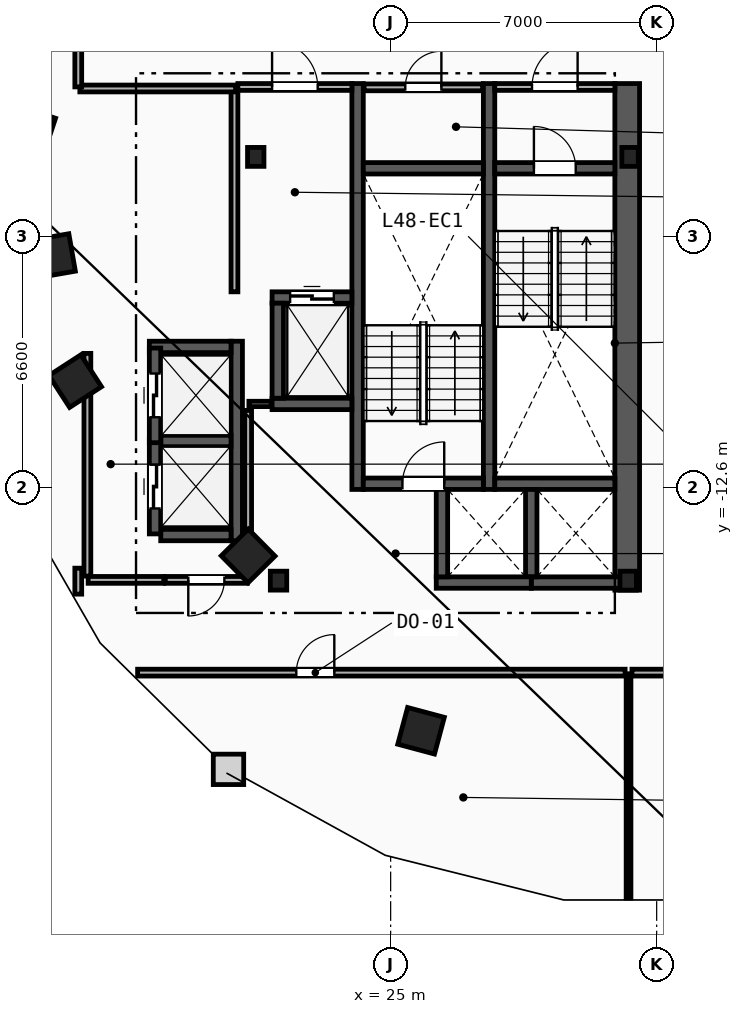
"""IFC4 building model, lengths in metres.
Left out: names, types, materials, properties, quantities, classifications, styles, units other than length and angle.
Written with IfcOpenShell. Run it as: python <this file> out.ifc"""

import sys

from ifc_helpers import new_model, si_unit, direction, frame, frame_2d, origin, origin_2d, place, context, subcontext, project, spatial, rectangle, i_section, extrude, element, fill, save


model = new_model("IFC4")
c1 = context("Model", 3, precision=1e-05, world=origin(), true_north=direction((0.0, 1.0)))
c2 = subcontext(c1, "Body", "Model", "MODEL_VIEW")
j1 = project(units=[si_unit("LENGTHUNIT", "METRE"), si_unit("PLANEANGLEUNIT", "RADIAN")], contexts=[c1])
p1 = place(None, origin())
s1 = spatial("IfcSite", under=j1, at=p1, CompositionType="ELEMENT")
p2 = place(p1, origin())
s2 = spatial("IfcBuilding", under=s1, at=p2, CompositionType="ELEMENT")
p3 = place(p2, frame((0.0, 0.0, 183.6)))
s3 = spatial("IfcBuildingStorey", under=s2, at=p3, CompositionType="ELEMENT", Elevation=183.6)
for number, where, z_axis, x_axis in (
    (1, (31.3, -3.9, 0.0), (0.0, 0.0, 1.0), (1.0, 0.0, 0.0)),
    (2, (21.45, -3.9, 0.0), (0.0, 0.0, 1.0), (1.0, 0.0, 0.0)),
    (3, (22.05, -15.05, 0.0), (0.0, 0.0, 1.0), (1.0, 0.0, 0.0)),
    (4, (31.25, -15.05, 0.0), (0.0, 0.0, 1.0), (1.0, 0.0, 0.0)),
):
    element("IfcColumn", number, at=place(p3, frame(where, z_axis=z_axis, x_axis=x_axis)), inside=s3, PredefinedType="COLUMN", context=c2, shape_type="SweptSolid", body=[
        extrude(i_section(OverallWidth=0.432, OverallDepth=0.498, WebThickness=0.056, FlangeThickness=0.089, FilletRadius=0.018, at=origin_2d()), origin(), (0.0, 0.0, 1.0), 3.6),
    ])
for number, where, z_axis, x_axis in (
    (5, (15.55, -3.2, 0.0), (0.0, 0.0, 1.0), (-0.315, -0.949, 0.0)),
    (6, (16.125, -6.5, 0.0), (0.0, 0.0, 1.0), (0.172, -0.985, 0.0)),
    (7, (16.7, -9.8, 0.0), (0.0, 0.0, 1.0), (0.544, -0.839, 0.0)),
    (8, (21.25, -14.4, 0.0), (0.0, 0.0, 1.0), (0.703, -0.711, 0.0)),
    (9, (25.8, -19.0, 0.0), (0.0, 0.0, 1.0), (0.966, -0.259, 0.0)),
):
    element("IfcColumn", number, at=place(p3, frame(where, z_axis=z_axis, x_axis=x_axis)), inside=s3, PredefinedType="COLUMN", context=c2, shape_type="SweptSolid", body=[
        extrude(rectangle(XDim=1.0, YDim=1.0, at=origin_2d()), origin(), (0.0, 0.0, 1.0), 3.6),
    ])
p4 = place(p3, frame((31.225, -15.3, 0.0), z_axis=(0.0, 0.0, 1.0), x_axis=(0.0, 1.0, 0.0)))
e10 = element("IfcWall", 10, at=p4, inside=s3, PredefinedType="SHEAR", context=c2, shape_type="SweptSolid", body=[
    extrude(rectangle(XDim=13.33, YDim=0.65, at=frame_2d((6.665, 0.0))), origin(), (0.0, 0.0, 1.0), 3.32),
])
for number, where, z_axis, x_axis in (
    (11, (27.59, -12.65, 0.0), (0.0, 0.0, 1.0), (0.0, 1.0, 0.0)),
    (12, (24.13, -12.65, 0.0), (0.0, 0.0, 1.0), (0.0, 1.0, 0.0)),
):
    element("IfcWall", number, at=place(p3, frame(where, z_axis=z_axis, x_axis=x_axis)), inside=s3, PredefinedType="SHEAR", context=c2, shape_type="SweptSolid", body=[
        extrude(rectangle(XDim=10.68, YDim=0.3, at=frame_2d((5.34, 0.0))), origin(), (0.0, 0.0, 1.0), 3.32),
    ])
p5 = place(p3, frame((27.74, -4.2, 0.0), z_axis=(0.0, 0.0, 1.0), x_axis=(1.0, 0.0, 0.0)))
e13 = element("IfcWall", 13, at=p5, inside=s3, PredefinedType="SHEAR", context=c2, shape_type="SweptSolid", body=[
    extrude(rectangle(XDim=3.16, YDim=0.3, at=frame_2d((1.58, 0.0))), origin(), (0.0, 0.0, 1.0), 3.32),
])
p6 = place(p5, frame((1.03, 0.0, 0.0)))
e14 = element("IfcOpeningElement", 14, at=p6, cuts=e13, PredefinedType="OPENING", context=c2, shape_type="SweptSolid", body=[
    extrude(rectangle(XDim=1.1, YDim=2.15, at=frame_2d((0.55, 1.075))), frame((0.0, 0.16, 0.0), z_axis=(0.0, -1.0, 0.0), x_axis=(1.0, 0.0, 0.0)), (0.0, 0.0, 1.0), 0.32),
])
p7 = place(p3, frame((27.74, -12.5, 0.0), z_axis=(0.0, 0.0, 1.0), x_axis=(1.0, 0.0, 0.0)))
e15 = element("IfcWall", 15, at=p7, inside=s3, PredefinedType="SHEAR", context=c2, shape_type="SweptSolid", body=[
    extrude(rectangle(XDim=3.16, YDim=0.3, at=frame_2d((1.58, 0.0))), origin(), (0.0, 0.0, 1.0), 3.32),
])
p8 = place(p3, frame((24.28, -12.5, 0.0), z_axis=(0.0, 0.0, 1.0), x_axis=(1.0, 0.0, 0.0)))
e16 = element("IfcWall", 16, at=p8, inside=s3, PredefinedType="SHEAR", context=c2, shape_type="SweptSolid", body=[
    extrude(rectangle(XDim=3.16, YDim=0.3, at=frame_2d((1.58, 0.0))), origin(), (0.0, 0.0, 1.0), 3.32),
])
p9 = place(p8, frame((1.03, 0.0, 0.0)))
e17 = element("IfcOpeningElement", 17, at=p9, cuts=e16, PredefinedType="OPENING", context=c2, shape_type="SweptSolid", body=[
    extrude(rectangle(XDim=1.1, YDim=2.15, at=frame_2d((0.55, 1.075))), frame((0.0, 0.16, 0.0), z_axis=(0.0, -1.0, 0.0), x_axis=(1.0, 0.0, 0.0)), (0.0, 0.0, 1.0), 0.32),
])
p10 = place(p3, frame((24.28, -4.2, 0.0), z_axis=(0.0, 0.0, 1.0), x_axis=(1.0, 0.0, 0.0)))
e18 = element("IfcWall", 18, at=p10, inside=s3, PredefinedType="SHEAR", context=c2, shape_type="SweptSolid", body=[
    extrude(rectangle(XDim=3.16, YDim=0.3, at=frame_2d((1.58, 0.0))), origin(), (0.0, 0.0, 1.0), 3.32),
])
p11 = place(p3, frame((20.89, -7.45, 0.0), z_axis=(0.0, 0.0, 1.0), x_axis=(0.0, 1.0, 0.0)))
e19 = element("IfcWall", 19, at=p11, inside=s3, PredefinedType="PARTITIONING", context=c2, shape_type="SweptSolid", body=[
    extrude(rectangle(XDim=5.3, YDim=0.18, at=frame_2d((2.65, 0.0))), origin(), (0.0, 0.0, 1.0), 3.32),
])
p12 = place(p3, frame((20.98, -2.06, 0.0), z_axis=(0.0, 0.0, 1.0), x_axis=(1.0, 0.0, 0.0)))
e20 = element("IfcWall", 20, at=p12, inside=s3, PredefinedType="PARTITIONING", context=c2, shape_type="SweptSolid", body=[
    extrude(rectangle(XDim=3.0, YDim=0.18, at=frame_2d((1.5, 0.0))), origin(), (0.0, 0.0, 1.0), 3.32),
])
p13 = place(p12, frame((0.9, 0.0, 0.0)))
e21 = element("IfcOpeningElement", 21, at=p13, cuts=e20, PredefinedType="OPENING", context=c2, shape_type="SweptSolid", body=[
    extrude(rectangle(XDim=1.2, YDim=2.15, at=frame_2d((0.6, 1.075))), frame((0.0, 0.1, 0.0), z_axis=(0.0, -1.0, 0.0), x_axis=(1.0, 0.0, 0.0)), (0.0, 0.0, 1.0), 0.2),
])
p14 = place(p3, frame((27.74, -2.06, 0.0), z_axis=(0.0, 0.0, 1.0), x_axis=(1.0, 0.0, 0.0)))
e22 = element("IfcWall", 22, at=p14, inside=s3, PredefinedType="PARTITIONING", context=c2, shape_type="SweptSolid", body=[
    extrude(rectangle(XDim=3.16, YDim=0.18, at=frame_2d((1.58, 0.0))), origin(), (0.0, 0.0, 1.0), 3.32),
])
p15 = place(p14, frame((0.98, 0.0, 0.0)))
e23 = element("IfcOpeningElement", 23, at=p15, cuts=e22, PredefinedType="OPENING", context=c2, shape_type="SweptSolid", body=[
    extrude(rectangle(XDim=1.2, YDim=2.15, at=frame_2d((0.6, 1.075))), frame((0.0, 0.1, 0.0), z_axis=(0.0, -1.0, 0.0), x_axis=(1.0, 0.0, 0.0)), (0.0, 0.0, 1.0), 0.2),
])
p16 = place(p3, frame((21.88, -7.6, 0.0), z_axis=(0.0, 0.0, 1.0), x_axis=(1.0, 0.0, 0.0)))
e24 = element("IfcWall", 24, at=p16, inside=s3, PredefinedType="SHEAR", context=c2, shape_type="SweptSolid", body=[
    extrude(rectangle(XDim=2.1, YDim=0.3, at=frame_2d((1.05, 0.0))), origin(), (0.0, 0.0, 1.0), 3.32),
])
p17 = place(p16, frame((0.475, 0.0, 0.0)))
e25 = element("IfcOpeningElement", 25, at=p17, cuts=e24, PredefinedType="OPENING", context=c2, shape_type="SweptSolid", body=[
    extrude(rectangle(XDim=1.15, YDim=2.2, at=frame_2d((0.575, 1.1))), frame((0.0, 0.16, 0.0), z_axis=(0.0, -1.0, 0.0), x_axis=(1.0, 0.0, 0.0)), (0.0, 0.0, 1.0), 0.32),
])
p18 = place(p3, frame((21.88, -10.4, 0.0), z_axis=(0.0, 0.0, 1.0), x_axis=(1.0, 0.0, 0.0)))
e26 = element("IfcWall", 26, at=p18, inside=s3, PredefinedType="SHEAR", context=c2, shape_type="SweptSolid", body=[
    extrude(rectangle(XDim=2.1, YDim=0.3, at=frame_2d((1.05, 0.0))), origin(), (0.0, 0.0, 1.0), 3.32),
])
for number, where, z_axis, x_axis in (
    (27, (22.03, -10.25, 0.0), (0.0, 0.0, 1.0), (0.0, 1.0, 0.0)),
    (28, (28.7, -15.1, 0.0), (0.0, 0.0, 1.0), (1.0, 0.0, 0.0)),
):
    element("IfcWall", number, at=place(p3, frame(where, z_axis=z_axis, x_axis=x_axis)), inside=s3, PredefinedType="SHEAR", context=c2, shape_type="SweptSolid", body=[
        extrude(rectangle(XDim=2.5, YDim=0.3, at=frame_2d((1.25, 0.0))), origin(), (0.0, 0.0, 1.0), 3.32),
    ])
p19 = place(p3, frame((28.7, -14.95, 0.0), z_axis=(0.0, 0.0, 1.0), x_axis=(0.0, 1.0, 0.0)))
e29 = element("IfcWall", 29, at=p19, inside=s3, PredefinedType="SHEAR", context=c2, shape_type="SweptSolid", body=[
    extrude(rectangle(XDim=2.3, YDim=0.3, at=frame_2d((1.15, 0.0))), origin(), (0.0, 0.0, 1.0), 3.32),
])
p20 = place(p3, frame((26.2, -15.1, 0.0), z_axis=(0.0, 0.0, 1.0), x_axis=(1.0, 0.0, 0.0)))
e30 = element("IfcWall", 30, at=p20, inside=s3, PredefinedType="SHEAR", context=c2, shape_type="SweptSolid", body=[
    extrude(rectangle(XDim=2.5, YDim=0.3, at=frame_2d((1.25, 0.0))), origin(), (0.0, 0.0, 1.0), 3.32),
])
p21 = place(p3, frame((26.35, -14.95, 0.0), z_axis=(0.0, 0.0, 1.0), x_axis=(0.0, 1.0, 0.0)))
e31 = element("IfcWall", 31, at=p21, inside=s3, PredefinedType="SHEAR", context=c2, shape_type="SweptSolid", body=[
    extrude(rectangle(XDim=2.3, YDim=0.3, at=frame_2d((1.15, 0.0))), origin(), (0.0, 0.0, 1.0), 3.32),
])
p22 = place(p3, frame((20.95, -14.0, 0.0), z_axis=(0.0, 0.0, 1.0), x_axis=(0.0, 1.0, 0.0)))
e32 = element("IfcWall", 32, at=p22, inside=s3, PredefinedType="SHEAR", context=c2, shape_type="SweptSolid", body=[
    extrude(rectangle(XDim=5.25, YDim=0.3, at=frame_2d((2.625, 0.0))), origin(), (0.0, 0.0, 1.0), 3.32),
])
p23 = place(p3, frame((18.95, -13.85, 0.0), z_axis=(0.0, 0.0, 1.0), x_axis=(1.0, 0.0, 0.0)))
e33 = element("IfcWall", 33, at=p23, inside=s3, PredefinedType="SHEAR", context=c2, shape_type="SweptSolid", body=[
    extrude(rectangle(XDim=1.85, YDim=0.3, at=frame_2d((0.925, 0.0))), origin(), (0.0, 0.0, 1.0), 3.32),
])
p24 = place(p3, frame((18.65, -8.9, 0.0), z_axis=(0.0, 0.0, 1.0), x_axis=(1.0, 0.0, 0.0)))
e34 = element("IfcWall", 34, at=p24, inside=s3, PredefinedType="SHEAR", context=c2, shape_type="SweptSolid", body=[
    extrude(rectangle(XDim=2.15, YDim=0.3, at=frame_2d((1.075, 0.0))), origin(), (0.0, 0.0, 1.0), 3.32),
])
p25 = place(p3, frame((18.95, -11.375, 0.0), z_axis=(0.0, 0.0, 1.0), x_axis=(1.0, 0.0, 0.0)))
e35 = element("IfcWall", 35, at=p25, inside=s3, PredefinedType="SHEAR", context=c2, shape_type="SweptSolid", body=[
    extrude(rectangle(XDim=1.85, YDim=0.3, at=frame_2d((0.925, 0.0))), origin(), (0.0, 0.0, 1.0), 3.32),
])
p26 = place(p3, frame((18.8, -13.82, 0.0), z_axis=(0.0, 0.0, 1.0), x_axis=(0.0, 1.0, 0.0)))
e36 = element("IfcWall", 36, at=p26, inside=s3, PredefinedType="SHEAR", context=c2, shape_type="SweptSolid", body=[
    extrude(rectangle(XDim=2.49, YDim=0.3, at=frame_2d((1.245, 0.0))), origin(), (0.0, 0.0, 1.0), 3.32),
])
p27 = place(p26, frame((0.67, 0.0, 0.0)))
e37 = element("IfcOpeningElement", 37, at=p27, cuts=e36, PredefinedType="OPENING", context=c2, shape_type="SweptSolid", body=[
    extrude(rectangle(XDim=1.15, YDim=2.2, at=frame_2d((0.575, 1.1))), frame((0.0, 0.16, 0.0), z_axis=(0.0, -1.0, 0.0), x_axis=(1.0, 0.0, 0.0)), (0.0, 0.0, 1.0), 0.32),
])
p28 = place(p3, frame((18.8, -11.42, 0.0), z_axis=(0.0, 0.0, 1.0), x_axis=(0.0, 1.0, 0.0)))
e38 = element("IfcWall", 38, at=p28, inside=s3, PredefinedType="SHEAR", context=c2, shape_type="SweptSolid", body=[
    extrude(rectangle(XDim=2.49, YDim=0.3, at=frame_2d((1.245, 0.0))), origin(), (0.0, 0.0, 1.0), 3.32),
])
p29 = place(p28, frame((0.67, 0.0, 0.0)))
e39 = element("IfcOpeningElement", 39, at=p29, cuts=e38, PredefinedType="OPENING", context=c2, shape_type="SweptSolid", body=[
    extrude(rectangle(XDim=1.15, YDim=2.2, at=frame_2d((0.575, 1.1))), frame((0.0, 0.16, 0.0), z_axis=(0.0, -1.0, 0.0), x_axis=(1.0, 0.0, 0.0)), (0.0, 0.0, 1.0), 0.32),
])
p30 = place(p3, frame((17.02, -14.93, 0.0), z_axis=(0.0, 0.0, 1.0), x_axis=(0.0, 1.0, 0.0)))
e40 = element("IfcWall", 40, at=p30, inside=s3, PredefinedType="PARTITIONING", context=c2, shape_type="SweptSolid", body=[
    extrude(rectangle(XDim=5.86, YDim=0.18, at=frame_2d((2.93, 0.0))), origin(), (0.0, 0.0, 1.0), 3.32),
])
p31 = place(p3, frame((17.04, -15.03, 0.0), z_axis=(0.0, 0.0, 1.0), x_axis=(1.0, 0.0, 0.0)))
e41 = element("IfcWall", 41, at=p31, inside=s3, PredefinedType="PARTITIONING", context=c2, shape_type="SweptSolid", body=[
    extrude(rectangle(XDim=1.99, YDim=0.18, at=frame_2d((0.995, 0.0))), origin(), (0.0, 0.0, 1.0), 3.32),
])
p32 = place(p3, frame((21.23, -15.03, 0.0), z_axis=(0.0, 0.0, 1.0), x_axis=(-1.0, 0.0, 0.0)))
e42 = element("IfcWall", 42, at=p32, inside=s3, PredefinedType="PARTITIONING", context=c2, shape_type="SweptSolid", body=[
    extrude(rectangle(XDim=2.16, YDim=0.18, at=frame_2d((1.08, 0.0))), origin(), (0.0, 0.0, 1.0), 3.32),
])
p33 = place(p32, frame((0.605, 0.0, 0.0)))
e43 = element("IfcOpeningElement", 43, at=p33, cuts=e42, PredefinedType="OPENING", context=c2, shape_type="SweptSolid", body=[
    extrude(rectangle(XDim=0.95, YDim=2.1, at=frame_2d((0.475, 1.05))), frame((0.0, 0.1, 0.0), z_axis=(0.0, -1.0, 0.0), x_axis=(1.0, 0.0, 0.0)), (0.0, 0.0, 1.0), 0.2),
])
p34 = place(p3, frame((21.27, -10.4, 0.0), z_axis=(0.0, 0.0, 1.0), x_axis=(1.0, 0.0, 0.0)))
e44 = element("IfcWall", 44, at=p34, inside=s3, PredefinedType="PARTITIONING", context=c2, shape_type="SweptSolid", body=[
    extrude(rectangle(XDim=0.59, YDim=0.14, at=frame_2d((0.295, 0.0))), origin(), (0.0, 0.0, 1.0), 3.32),
])
p35 = place(p3, frame((21.25, -14.93, 0.0), z_axis=(0.0, 0.0, 1.0), x_axis=(0.0, 1.0, 0.0)))
e45 = element("IfcWall", 45, at=p35, inside=s3, PredefinedType="PARTITIONING", context=c2, shape_type="SweptSolid", body=[
    extrude(rectangle(XDim=4.36, YDim=0.18, at=frame_2d((2.18, 0.0))), origin(), (0.0, 0.0, 1.0), 3.32),
])
p36 = place(p3, frame((24.3, -2.07, 0.0), z_axis=(0.0, 0.0, 1.0), x_axis=(1.0, 0.0, 0.0)))
e46 = element("IfcWall", 46, at=p36, inside=s3, PredefinedType="PARTITIONING", context=c2, shape_type="SweptSolid", body=[
    extrude(rectangle(XDim=3.12, YDim=0.18, at=frame_2d((1.56, 0.0))), origin(), (0.0, 0.0, 1.0), 3.32),
])
p37 = place(p36, frame((1.085, 0.0, 0.0)))
e47 = element("IfcOpeningElement", 47, at=p37, cuts=e46, PredefinedType="OPENING", context=c2, shape_type="SweptSolid", body=[
    extrude(rectangle(XDim=0.95, YDim=2.1, at=frame_2d((0.475, 1.05))), frame((0.0, 0.1, 0.0), z_axis=(0.0, -1.0, 0.0), x_axis=(1.0, 0.0, 0.0)), (0.0, 0.0, 1.0), 0.2),
])
p38 = place(p3, frame((31.26, -23.402, 0.0), z_axis=(0.0, 0.0, 1.0), x_axis=(0.0, 1.0, 0.0)))
e48 = element("IfcWall", 48, at=p38, inside=s3, PredefinedType="PARTITIONING", context=c2, shape_type="SweptSolid", body=[
    extrude(rectangle(XDim=5.902, YDim=0.125, at=frame_2d((2.951, 0.0))), origin(), (0.0, 0.0, 1.0), 3.32),
])
p39 = place(p3, frame((18.342, -17.47, 0.0), z_axis=(0.0, 0.0, 1.0), x_axis=(1.0, 0.0, 0.0)))
e49 = element("IfcWall", 49, at=p39, inside=s3, PredefinedType="PARTITIONING", context=c2, shape_type="SweptSolid", body=[
    extrude(rectangle(XDim=12.828, YDim=0.18, at=frame_2d((6.414, 0.0))), origin(), (0.0, 0.0, 1.0), 3.32),
])
p40 = place(p39, frame((4.176, 0.0, 0.0)))
e50 = element("IfcOpeningElement", 50, at=p40, cuts=e49, PredefinedType="OPENING", context=c2, shape_type="SweptSolid", body=[
    extrude(rectangle(XDim=1.0, YDim=2.15, at=frame_2d((0.5, 1.075))), frame((0.0, 0.1, 0.0), z_axis=(0.0, -1.0, 0.0), x_axis=(1.0, 0.0, 0.0)), (0.0, 0.0, 1.0), 0.2),
])
p41 = place(p3, frame((16.822, -2.1, 0.0), z_axis=(0.0, 0.0, 1.0), x_axis=(1.0, 0.0, 0.0)))
e51 = element("IfcWall", 51, at=p41, inside=s3, PredefinedType="PARTITIONING", context=c2, shape_type="SweptSolid", body=[
    extrude(rectangle(XDim=4.098, YDim=0.18, at=frame_2d((2.049, 0.0))), origin(), (0.0, 0.0, 1.0), 3.32),
])
p42 = place(p3, frame((16.78, 0.329, 0.0), z_axis=(0.0, 0.0, 1.0), x_axis=(0.0, -1.0, 0.0)))
e52 = element("IfcWall", 52, at=p42, inside=s3, PredefinedType="PARTITIONING", context=c2, shape_type="SweptSolid", body=[
    extrude(rectangle(XDim=2.387, YDim=0.18, at=frame_2d((1.194, 0.0))), origin(), (0.0, 0.0, 1.0), 3.32),
])
p43 = place(p3, frame((16.78, -14.721, 0.0), z_axis=(0.0, 0.0, 1.0), x_axis=(0.0, -1.0, 0.0)))
e53 = element("IfcWall", 53, at=p43, inside=s3, PredefinedType="PARTITIONING", context=c2, shape_type="SweptSolid", body=[
    extrude(rectangle(XDim=0.684, YDim=0.18, at=frame_2d((0.342, 0.0))), origin(), (0.0, 0.0, 1.0), 3.32),
])
p44 = place(p3, frame((31.35, -17.47, 0.0), z_axis=(0.0, 0.0, 1.0), x_axis=(1.0, 0.0, 0.0)))
e54 = element("IfcWall", 54, at=p44, inside=s3, PredefinedType="PARTITIONING", context=c2, shape_type="SweptSolid", body=[
    extrude(rectangle(XDim=2.278, YDim=0.18, at=frame_2d((1.139, 0.0))), origin(), (0.0, 0.0, 1.0), 3.32),
])
p45 = place(p6, origin())
e55 = element("IfcDoor", 55, at=p45, inside=s3, OperationType="SINGLE_SWING_LEFT", PredefinedType="DOOR", context=c2, shape_type="SweptSolid", body=[
    extrude(rectangle(XDim=1.1, YDim=2.15, at=frame_2d((0.55, 1.075))), frame((0.0, 0.025, 0.0), z_axis=(0.0, -1.0, 0.0), x_axis=(1.0, 0.0, 0.0)), (0.0, 0.0, 1.0), 0.05),
])
fill(e14, e55)
p46 = place(p9, origin())
e56 = element("IfcDoor", 56, at=p46, inside=s3, OperationType="SINGLE_SWING_RIGHT", PredefinedType="DOOR", context=c2, shape_type="SweptSolid", body=[
    extrude(rectangle(XDim=1.1, YDim=2.15, at=frame_2d((0.55, 1.075))), frame((0.0, 0.025, 0.0), z_axis=(0.0, -1.0, 0.0), x_axis=(1.0, 0.0, 0.0)), (0.0, 0.0, 1.0), 0.05),
])
fill(e17, e56)
p47 = place(p13, origin())
e57 = element("IfcDoor", 57, at=p47, inside=s3, OperationType="SINGLE_SWING_LEFT", PredefinedType="DOOR", context=c2, shape_type="SweptSolid", body=[
    extrude(rectangle(XDim=1.2, YDim=2.15, at=frame_2d((0.6, 1.075))), frame((0.0, 0.025, 0.0), z_axis=(0.0, -1.0, 0.0), x_axis=(1.0, 0.0, 0.0)), (0.0, 0.0, 1.0), 0.05),
])
fill(e21, e57)
p48 = place(p15, origin())
e58 = element("IfcDoor", 58, at=p48, inside=s3, OperationType="SINGLE_SWING_RIGHT", PredefinedType="DOOR", context=c2, shape_type="SweptSolid", body=[
    extrude(rectangle(XDim=1.2, YDim=2.15, at=frame_2d((0.6, 1.075))), frame((0.0, 0.025, 0.0), z_axis=(0.0, -1.0, 0.0), x_axis=(1.0, 0.0, 0.0)), (0.0, 0.0, 1.0), 0.05),
])
fill(e23, e58)
p49 = place(p17, origin())
e59 = element("IfcDoor", 59, at=p49, inside=s3, OperationType="SLIDING_TO_LEFT", PredefinedType="TRAPDOOR", context=c2, shape_type="SweptSolid", body=[
    extrude(rectangle(XDim=1.15, YDim=2.2, at=frame_2d((0.575, 1.1))), frame((0.0, 0.025, 0.0), z_axis=(0.0, -1.0, 0.0), x_axis=(1.0, 0.0, 0.0)), (0.0, 0.0, 1.0), 0.05),
])
fill(e25, e59)
p50 = place(p27, origin())
e60 = element("IfcDoor", 60, at=p50, inside=s3, OperationType="SLIDING_TO_LEFT", PredefinedType="TRAPDOOR", context=c2, shape_type="SweptSolid", body=[
    extrude(rectangle(XDim=1.15, YDim=2.2, at=frame_2d((0.575, 1.1))), frame((0.0, 0.025, 0.0), z_axis=(0.0, -1.0, 0.0), x_axis=(1.0, 0.0, 0.0)), (0.0, 0.0, 1.0), 0.05),
])
fill(e37, e60)
p51 = place(p29, origin())
e61 = element("IfcDoor", 61, at=p51, inside=s3, OperationType="SLIDING_TO_LEFT", PredefinedType="TRAPDOOR", context=c2, shape_type="SweptSolid", body=[
    extrude(rectangle(XDim=1.15, YDim=2.2, at=frame_2d((0.575, 1.1))), frame((0.0, 0.025, 0.0), z_axis=(0.0, -1.0, 0.0), x_axis=(1.0, 0.0, 0.0)), (0.0, 0.0, 1.0), 0.05),
])
fill(e39, e61)
p52 = place(p40, origin())
e62 = element("IfcDoor", 62, at=p52, inside=s3, OperationType="SINGLE_SWING_RIGHT", PredefinedType="DOOR", context=c2, shape_type="SweptSolid", body=[
    extrude(rectangle(XDim=1.0, YDim=2.15, at=frame_2d((0.5, 1.075))), frame((0.0, 0.025, 0.0), z_axis=(0.0, -1.0, 0.0), x_axis=(1.0, 0.0, 0.0)), (0.0, 0.0, 1.0), 0.05),
])
fill(e50, e62)
p53 = place(p37, origin())
e63 = element("IfcDoor", 63, at=p53, inside=s3, OperationType="SINGLE_SWING_RIGHT", PredefinedType="DOOR", context=c2, shape_type="SweptSolid", body=[
    extrude(rectangle(XDim=0.95, YDim=2.1, at=frame_2d((0.475, 1.05))), frame((0.0, 0.025, 0.0), z_axis=(0.0, -1.0, 0.0), x_axis=(1.0, 0.0, 0.0)), (0.0, 0.0, 1.0), 0.05),
])
fill(e47, e63)
p54 = place(p33, origin())
e64 = element("IfcDoor", 64, at=p54, inside=s3, OperationType="SINGLE_SWING_RIGHT", PredefinedType="DOOR", context=c2, shape_type="SweptSolid", body=[
    extrude(rectangle(XDim=0.95, YDim=2.1, at=frame_2d((0.475, 1.05))), frame((0.0, 0.025, 0.0), z_axis=(0.0, -1.0, 0.0), x_axis=(1.0, 0.0, 0.0)), (0.0, 0.0, 1.0), 0.05),
])
fill(e43, e64)
save(model, sys.argv[1])
